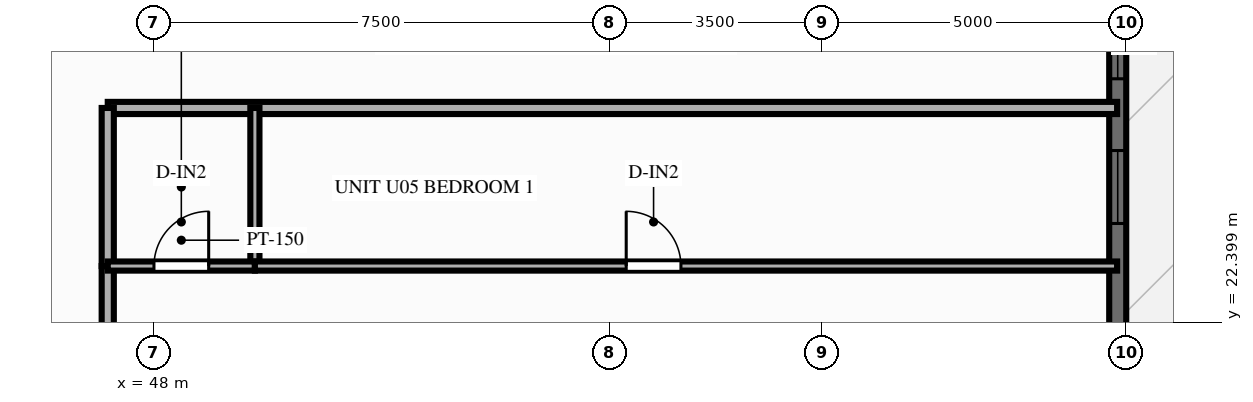
"""IFC4 building model, lengths in metres.
Left out: names, types, materials, properties, quantities, classifications, styles, units other than length and angle.
Written with IfcOpenShell. Run it as: python <this file> out.ifc"""

import sys

from ifc_helpers import new_model, si_unit, direction, frame, frame_2d, origin, place, context, subcontext, project, spatial, rectangle, extrude, source, transform, mapped, element, fill, save


model = new_model("IFC4")
c1 = context("Model", 3, precision=1e-05, world=origin(), true_north=direction((0.0, 1.0)))
c2 = subcontext(c1, "Body", "Model", "MODEL_VIEW")
j1 = project(units=[si_unit("LENGTHUNIT", "METRE"), si_unit("PLANEANGLEUNIT", "RADIAN")], contexts=[c1])
p1 = place(None, origin())
s1 = spatial("IfcSite", under=j1, at=p1, CompositionType="ELEMENT")
p2 = place(p1, origin())
s2 = spatial("IfcBuilding", under=s1, at=p2, CompositionType="ELEMENT")
p3 = place(p2, frame((0.0, 0.0, 98.85)))
s3 = spatial("IfcBuildingStorey", under=s2, at=p3, CompositionType="ELEMENT", Elevation=98.85)
p4 = place(p3, frame((63.86, 7.2, 0.0), z_axis=(0.0, 0.0, 1.0), x_axis=(0.0, 1.0, 0.0)))
e1 = element("IfcWall", 1, at=p4, inside=s3, PredefinedType="SOLIDWALL", context=c2, shape_type="SweptSolid", body=[
    extrude(rectangle(XDim=39.6, YDim=0.28, at=frame_2d((19.8, 0.0))), origin(), (0.0, 0.0, 1.0), 2.28),
])
p5 = place(p4, frame((0.945, 0.0, 0.25)))
e2 = element("IfcOpeningElement", 2, at=p5, cuts=e1, PredefinedType="OPENING", context=c2, shape_type="SweptSolid", body=[
    extrude(rectangle(XDim=1.2, YDim=1.5, at=frame_2d((0.6, 0.75))), frame((0.0, 0.152, 0.0), z_axis=(0.0, -1.0, 0.0), x_axis=(1.0, 0.0, 0.0)), (0.0, 0.0, 1.0), 0.304),
])
p6 = place(p4, frame((4.213, 0.0, 0.25)))
e3 = element("IfcOpeningElement", 3, at=p6, cuts=e1, PredefinedType="OPENING", context=c2, shape_type="SweptSolid", body=[
    extrude(rectangle(XDim=1.2, YDim=1.5, at=frame_2d((0.6, 0.75))), frame((0.0, 0.152, 0.0), z_axis=(0.0, -1.0, 0.0), x_axis=(1.0, 0.0, 0.0)), (0.0, 0.0, 1.0), 0.304),
])
p7 = place(p4, frame((7.55, 0.0, 0.25)))
e4 = element("IfcOpeningElement", 4, at=p7, cuts=e1, PredefinedType="OPENING", context=c2, shape_type="SweptSolid", body=[
    extrude(rectangle(XDim=1.2, YDim=1.5, at=frame_2d((0.6, 0.75))), frame((0.0, 0.152, 0.0), z_axis=(0.0, -1.0, 0.0), x_axis=(1.0, 0.0, 0.0)), (0.0, 0.0, 1.0), 0.304),
])
p8 = place(p4, frame((13.483, 0.0, 0.25)))
e5 = element("IfcOpeningElement", 5, at=p8, cuts=e1, PredefinedType="OPENING", context=c2, shape_type="SweptSolid", body=[
    extrude(rectangle(XDim=1.2, YDim=1.5, at=frame_2d((0.6, 0.75))), frame((0.0, 0.152, 0.0), z_axis=(0.0, -1.0, 0.0), x_axis=(1.0, 0.0, 0.0)), (0.0, 0.0, 1.0), 0.304),
])
p9 = place(p4, frame((16.82, 0.0, 0.25)))
e6 = element("IfcOpeningElement", 6, at=p9, cuts=e1, PredefinedType="OPENING", context=c2, shape_type="SweptSolid", body=[
    extrude(rectangle(XDim=1.2, YDim=1.5, at=frame_2d((0.6, 0.75))), frame((0.0, 0.152, 0.0), z_axis=(0.0, -1.0, 0.0), x_axis=(1.0, 0.0, 0.0)), (0.0, 0.0, 1.0), 0.304),
])
p10 = place(p4, frame((19.2, 0.0, 0.25)))
e7 = element("IfcOpeningElement", 7, at=p10, cuts=e1, PredefinedType="OPENING", context=c2, shape_type="SweptSolid", body=[
    extrude(rectangle(XDim=1.2, YDim=1.5, at=frame_2d((0.6, 0.75))), frame((0.0, 0.152, 0.0), z_axis=(0.0, -1.0, 0.0), x_axis=(1.0, 0.0, 0.0)), (0.0, 0.0, 1.0), 0.304),
])
p11 = place(p4, frame((21.578, 0.0, 0.25)))
e8 = element("IfcOpeningElement", 8, at=p11, cuts=e1, PredefinedType="OPENING", context=c2, shape_type="SweptSolid", body=[
    extrude(rectangle(XDim=1.2, YDim=1.5, at=frame_2d((0.6, 0.75))), frame((0.0, 0.152, 0.0), z_axis=(0.0, -1.0, 0.0), x_axis=(1.0, 0.0, 0.0)), (0.0, 0.0, 1.0), 0.304),
])
p12 = place(p4, frame((26.313, 0.0, 0.0), z_axis=(0.0, 0.0, 1.0), x_axis=(-1.0, 0.0, 0.0)))
e9 = element("IfcOpeningElement", 9, at=p12, cuts=e1, PredefinedType="OPENING", context=c2, shape_type="SweptSolid", body=[
    extrude(rectangle(XDim=1.6, YDim=2.15, at=frame_2d((0.8, 1.075))), frame((0.0, 0.152, 0.0), z_axis=(0.0, -1.0, 0.0), x_axis=(1.0, 0.0, 0.0)), (0.0, 0.0, 1.0), 0.304),
])
p13 = place(p4, frame((29.305, 0.0, 0.25)))
e10 = element("IfcOpeningElement", 10, at=p13, cuts=e1, PredefinedType="OPENING", context=c2, shape_type="SweptSolid", body=[
    extrude(rectangle(XDim=0.7, YDim=1.5, at=frame_2d((0.35, 0.75))), frame((0.0, 0.152, 0.0), z_axis=(0.0, -1.0, 0.0), x_axis=(1.0, 0.0, 0.0)), (0.0, 0.0, 1.0), 0.304),
])
p14 = place(p4, frame((30.848, 0.0, 0.25)))
e11 = element("IfcOpeningElement", 11, at=p14, cuts=e1, PredefinedType="OPENING", context=c2, shape_type="SweptSolid", body=[
    extrude(rectangle(XDim=1.2, YDim=1.5, at=frame_2d((0.6, 0.75))), frame((0.0, 0.152, 0.0), z_axis=(0.0, -1.0, 0.0), x_axis=(1.0, 0.0, 0.0)), (0.0, 0.0, 1.0), 0.304),
])
p15 = place(p4, frame((34.183, 0.0, 0.25)))
e12 = element("IfcOpeningElement", 12, at=p15, cuts=e1, PredefinedType="OPENING", context=c2, shape_type="SweptSolid", body=[
    extrude(rectangle(XDim=1.2, YDim=1.5, at=frame_2d((0.6, 0.75))), frame((0.0, 0.152, 0.0), z_axis=(0.0, -1.0, 0.0), x_axis=(1.0, 0.0, 0.0)), (0.0, 0.0, 1.0), 0.304),
])
p16 = place(p4, frame((37.452, 0.0, 0.25)))
e13 = element("IfcOpeningElement", 13, at=p16, cuts=e1, PredefinedType="OPENING", context=c2, shape_type="SweptSolid", body=[
    extrude(rectangle(XDim=1.2, YDim=1.5, at=frame_2d((0.6, 0.75))), frame((0.0, 0.152, 0.0), z_axis=(0.0, -1.0, 0.0), x_axis=(1.0, 0.0, 0.0)), (0.0, 0.0, 1.0), 0.304),
])
p17 = place(p3, frame((47.25, 25.92, 0.0), z_axis=(0.0, 0.0, 1.0), x_axis=(1.0, 0.0, 0.0)))
e14 = element("IfcWall", 14, at=p17, inside=s3, PredefinedType="PARTITIONING", context=c2, shape_type="SweptSolid", body=[
    extrude(rectangle(XDim=16.6, YDim=0.2, at=frame_2d((8.3, 0.0))), origin(), (0.0, 0.0, 1.0), 2.79),
])
p18 = place(p3, frame((47.25, 19.246, 0.0), z_axis=(0.0, 0.0, 1.0), x_axis=(0.0, 1.0, 0.0)))
e15 = element("IfcWall", 15, at=p18, inside=s3, PredefinedType="PARTITIONING", context=c2, shape_type="SweptSolid", body=[
    extrude(rectangle(XDim=4.074, YDim=0.2, at=frame_2d((2.037, 0.0))), origin(), (0.0, 0.0, 1.0), 2.79),
])
p19 = place(p18, frame((1.537, 0.0, 0.0)))
e16 = element("IfcOpeningElement", 16, at=p19, cuts=e15, PredefinedType="OPENING", context=c2, shape_type="SweptSolid", body=[
    extrude(rectangle(XDim=1.0, YDim=2.15, at=frame_2d((0.5, 1.075))), frame((0.0, 0.112, 0.0), z_axis=(0.0, -1.0, 0.0), x_axis=(1.0, 0.0, 0.0)), (0.0, 0.0, 1.0), 0.224),
])
p20 = place(p3, frame((47.25, 23.32, 0.0), z_axis=(0.0, 0.0, 1.0), x_axis=(0.0, 1.0, 0.0)))
e17 = element("IfcWall", 17, at=p20, inside=s3, PredefinedType="PARTITIONING", context=c2, shape_type="SweptSolid", body=[
    extrude(rectangle(XDim=2.6, YDim=0.2, at=frame_2d((1.3, 0.0))), origin(), (0.0, 0.0, 1.0), 2.79),
])
p21 = place(p3, frame((49.67, 23.32, 0.0), z_axis=(0.0, 0.0, 1.0), x_axis=(0.0, 1.0, 0.0)))
e18 = element("IfcWall", 18, at=p21, inside=s3, PredefinedType="PARTITIONING", context=c2, shape_type="SweptSolid", body=[
    extrude(rectangle(XDim=2.6, YDim=0.15, at=frame_2d((1.3, 0.0))), origin(), (0.0, 0.0, 1.0), 2.79),
])
p22 = place(p3, frame((47.25, 23.32, 0.0), z_axis=(0.0, 0.0, 1.0), x_axis=(1.0, 0.0, 0.0)))
e19 = element("IfcWall", 19, at=p22, inside=s3, PredefinedType="PARTITIONING", context=c2, shape_type="SweptSolid", body=[
    extrude(rectangle(XDim=2.42, YDim=0.15, at=frame_2d((1.21, 0.0))), origin(), (0.0, 0.0, 1.0), 2.79),
])
p23 = place(p22, frame((0.76, 0.0, 0.0)))
e20 = element("IfcOpeningElement", 20, at=p23, cuts=e19, PredefinedType="OPENING", context=c2, shape_type="SweptSolid", body=[
    extrude(rectangle(XDim=0.9, YDim=2.1, at=frame_2d((0.45, 1.05))), frame((0.0, 0.087, 0.0), z_axis=(0.0, -1.0, 0.0), x_axis=(1.0, 0.0, 0.0)), (0.0, 0.0, 1.0), 0.174),
])
p24 = place(p3, frame((49.67, 23.32, 0.0), z_axis=(0.0, 0.0, 1.0), x_axis=(1.0, 0.0, 0.0)))
e21 = element("IfcWall", 21, at=p24, inside=s3, PredefinedType="PARTITIONING", context=c2, shape_type="SweptSolid", body=[
    extrude(rectangle(XDim=14.18, YDim=0.15, at=frame_2d((7.09, 0.0))), origin(), (0.0, 0.0, 1.0), 2.79),
])
p25 = place(p24, frame((6.107, 0.0, 0.0)))
e22 = element("IfcOpeningElement", 22, at=p25, cuts=e21, PredefinedType="OPENING", context=c2, shape_type="SweptSolid", body=[
    extrude(rectangle(XDim=0.9, YDim=2.1, at=frame_2d((0.45, 1.05))), frame((0.0, 0.087, 0.0), z_axis=(0.0, -1.0, 0.0), x_axis=(1.0, 0.0, 0.0)), (0.0, 0.0, 1.0), 0.174),
])
m1 = source(origin(), c2, "Body", "SweptSolid", [
    extrude(rectangle(XDim=1.2, YDim=1.5, at=frame_2d((0.6, 0.75))), frame((0.0, 0.03, 0.0), z_axis=(0.0, -1.0, 0.0), x_axis=(1.0, 0.0, 0.0)), (0.0, 0.0, 1.0), 0.06),
])
p26 = place(p9, origin())
e23 = element("IfcWindow", 23, at=p26, inside=s3, PartitioningType="SINGLE_PANEL", PredefinedType="WINDOW", context=c2, shape_type="MappedRepresentation", body=[
    mapped(m1, transform((0.0, 0.0, 0.0), scale=1.0)),
])
fill(e6, e23)
p27 = place(p10, origin())
e24 = element("IfcWindow", 24, at=p27, inside=s3, PartitioningType="SINGLE_PANEL", PredefinedType="WINDOW", context=c2, shape_type="MappedRepresentation", body=[
    mapped(m1, transform((0.0, 0.0, 0.0), scale=1.0)),
])
fill(e7, e24)
m2 = source(origin(), c2, "Body", "SweptSolid", [
    extrude(rectangle(XDim=0.9, YDim=2.1, at=frame_2d((0.45, 1.05))), frame((0.0, 0.025, 0.0), z_axis=(0.0, -1.0, 0.0), x_axis=(1.0, 0.0, 0.0)), (0.0, 0.0, 1.0), 0.05),
])
p28 = place(p23, origin())
e25 = element("IfcDoor", 25, at=p28, inside=s3, OperationType="SINGLE_SWING_RIGHT", PredefinedType="DOOR", context=c2, shape_type="MappedRepresentation", body=[
    mapped(m2, transform((0.0, 0.0, 0.0), scale=1.0)),
])
fill(e20, e25)
p29 = place(p25, origin())
e26 = element("IfcDoor", 26, at=p29, inside=s3, OperationType="SINGLE_SWING_LEFT", PredefinedType="DOOR", context=c2, shape_type="MappedRepresentation", body=[
    mapped(m2, transform((0.0, 0.0, 0.0), scale=1.0)),
])
fill(e22, e26)
save(model, sys.argv[1])
